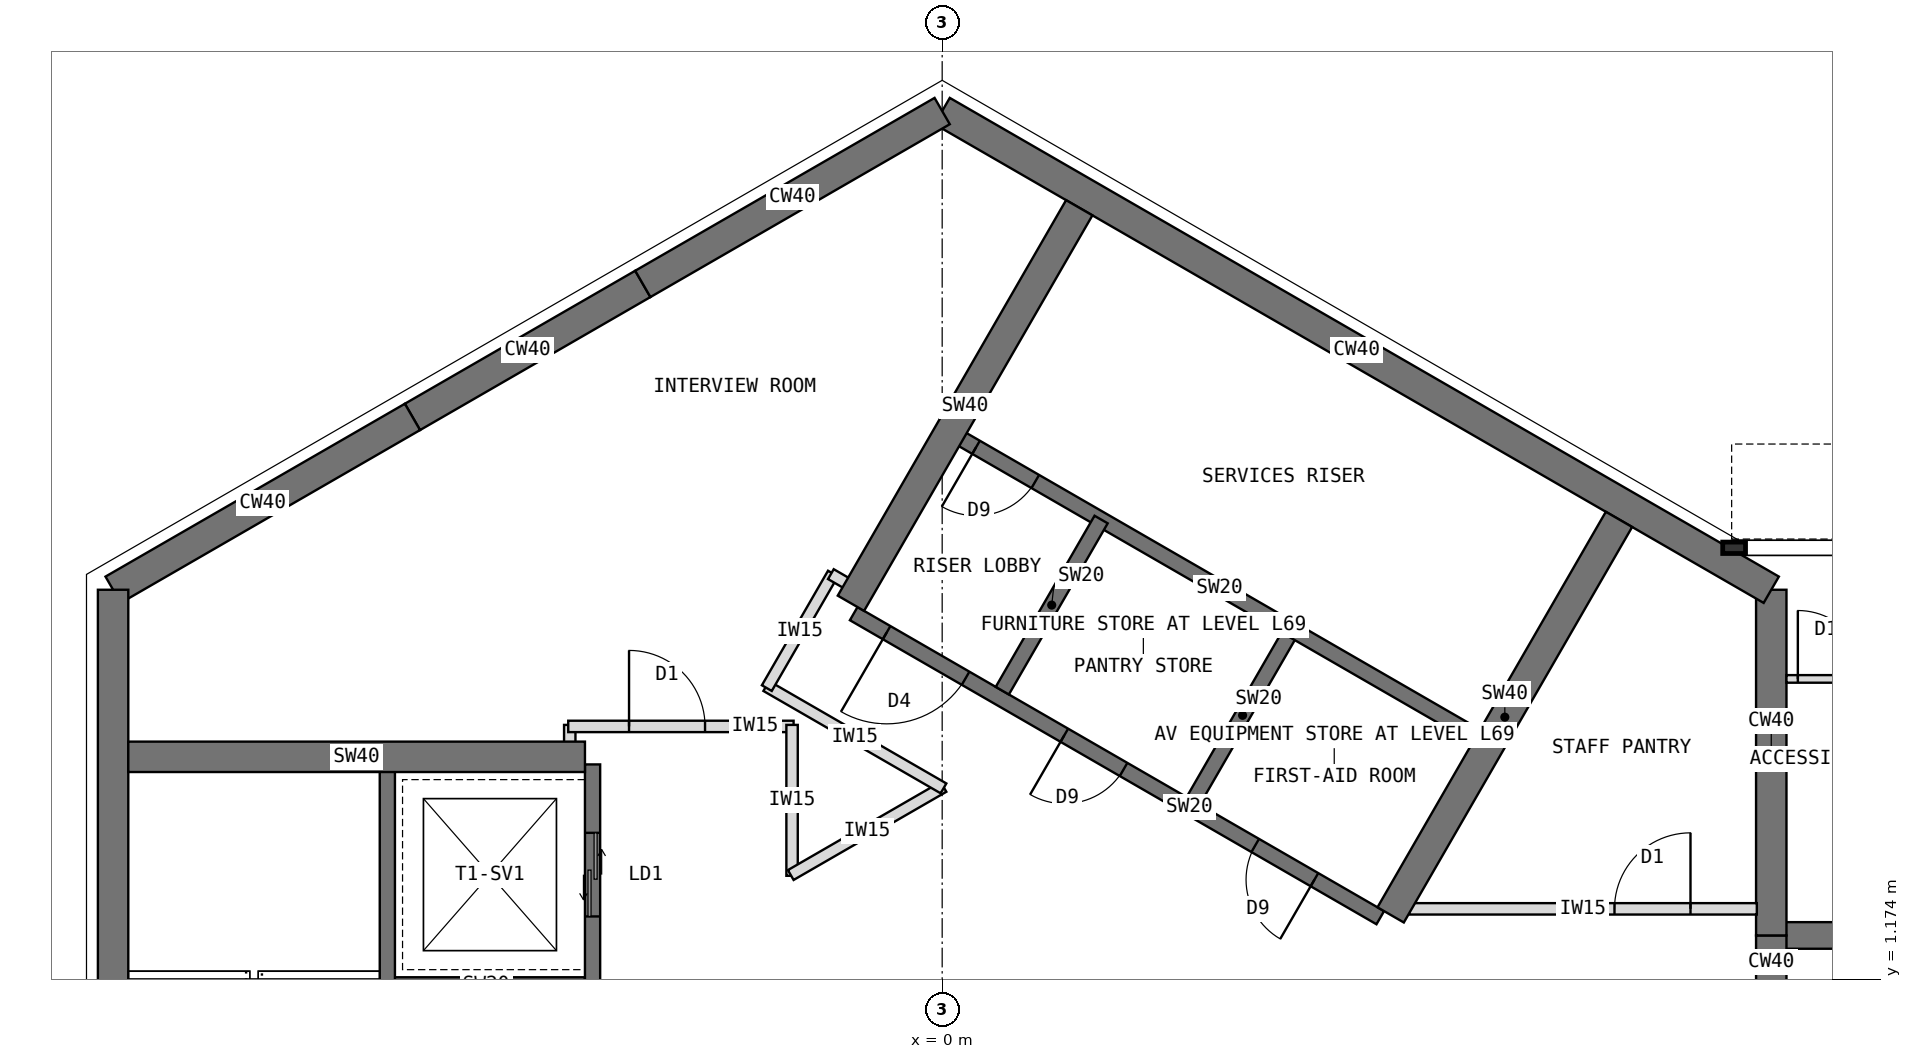
"""IFC4 building model, lengths in metres.
Left out: names, types, materials, properties, quantities, classifications, styles, units other than length and angle.
Written with IfcOpenShell. Run it as: python <this file> out.ifc"""

import sys

from ifc_helpers import new_model, si_unit, direction, frame, frame_2d, origin, place, context, subcontext, project, spatial, rectangle, extrude, element, fill, save


model = new_model("IFC4")
c1 = context("Model", 3, precision=1e-05, world=origin(), true_north=direction((0.0, 1.0)))
c2 = subcontext(c1, "Body", "Model", "MODEL_VIEW")
j1 = project(units=[si_unit("LENGTHUNIT", "METRE"), si_unit("PLANEANGLEUNIT", "RADIAN")], contexts=[c1])
p1 = place(None, origin())
s1 = spatial("IfcSite", under=j1, at=p1, CompositionType="ELEMENT")
p2 = place(p1, origin())
s2 = spatial("IfcBuilding", under=s1, at=p2, CompositionType="ELEMENT")
p3 = place(p2, frame((0.0, 0.0, 279.5)))
s3 = spatial("IfcBuildingStorey", under=s2, at=p3, CompositionType="ELEMENT", Elevation=279.5)
p4 = place(p3, frame((10.908, -1.75, 0.0), z_axis=(0.0, 0.0, 1.0), x_axis=(0.0, 1.0, 0.0)))
e1 = element("IfcWall", 1, at=p4, inside=s3, PredefinedType="SHEAR", context=c2, shape_type="SweptSolid", body=[
    extrude(rectangle(XDim=3.5, YDim=0.4, at=frame_2d((1.75, 0.0))), origin(), (0.0, 0.0, 1.0), 4.0),
])
p5 = place(p4, frame((0.85, 0.0, 0.0)))
e2 = element("IfcOpeningElement", 2, at=p5, cuts=e1, PredefinedType="OPENING", context=c2, shape_type="SweptSolid", body=[
    extrude(rectangle(XDim=1.8, YDim=2.1, at=frame_2d((0.9, 1.05))), frame((0.0, 0.21, 0.0), z_axis=(0.0, -1.0, 0.0), x_axis=(1.0, 0.0, 0.0)), (0.0, 0.0, 1.0), 0.42),
])
p6 = place(p3, frame((10.908, 1.75, 0.0), z_axis=(0.0, 0.0, 1.0), x_axis=(0.0, 1.0, 0.0)))
e3 = element("IfcWall", 3, at=p6, inside=s3, PredefinedType="SHEAR", context=c2, shape_type="SweptSolid", body=[
    extrude(rectangle(XDim=4.548, YDim=0.4, at=frame_2d((2.274, 0.0))), origin(), (0.0, 0.0, 1.0), 4.0),
])
p7 = place(p3, frame((10.908, 6.298, 0.0), z_axis=(0.0, 0.0, 1.0), x_axis=(-0.866021940709, 0.500005998175, 0.0)))
e4 = element("IfcWall", 4, at=p7, inside=s3, PredefinedType="SHEAR", context=c2, shape_type="SweptSolid", body=[
    extrude(rectangle(XDim=12.596, YDim=0.4, at=frame_2d((6.298, 0.0))), origin(), (0.0, 0.0, 1.0), 4.0),
])
p8 = place(p3, frame((0.0, 12.596, 0.0), z_axis=(0.0, 0.0, 1.0), x_axis=(-0.866011268655, -0.500024481964, 0.0)))
e5 = element("IfcWall", 5, at=p8, inside=s3, PredefinedType="SHEAR", context=c2, shape_type="SweptSolid", body=[
    extrude(rectangle(XDim=4.548, YDim=0.4, at=frame_2d((2.274, 0.0))), origin(), (0.0, 0.0, 1.0), 4.0),
])
p9 = place(p3, frame((-3.939, 10.322, 0.0), z_axis=(0.0, 0.0, 1.0), x_axis=(-0.866019471182, -0.500010275428, 0.0)))
e6 = element("IfcWall", 6, at=p9, inside=s3, PredefinedType="SHEAR", context=c2, shape_type="SweptSolid", body=[
    extrude(rectangle(XDim=3.5, YDim=0.4, at=frame_2d((1.75, 0.0))), origin(), (0.0, 0.0, 1.0), 4.0),
])
p10 = place(p3, frame((-6.97, 8.572, 0.0), z_axis=(0.0, 0.0, 1.0), x_axis=(-0.866034513004, -0.499984222037, 0.0)))
e7 = element("IfcWall", 7, at=p10, inside=s3, PredefinedType="SHEAR", context=c2, shape_type="SweptSolid", body=[
    extrude(rectangle(XDim=4.548, YDim=0.4, at=frame_2d((2.274, 0.0))), origin(), (0.0, 0.0, 1.0), 4.0),
])
p11 = place(p3, frame((-10.908, 6.298, 0.0), z_axis=(0.0, 0.0, 1.0), x_axis=(0.0, -1.0, 0.0)))
e8 = element("IfcWall", 8, at=p11, inside=s3, PredefinedType="SHEAR", context=c2, shape_type="SweptSolid", body=[
    extrude(rectangle(XDim=12.596, YDim=0.4, at=frame_2d((6.298, 0.0))), origin(), (0.0, 0.0, 1.0), 4.0),
])
p12 = place(p3, frame((10.908, 1.75, 0.0), z_axis=(0.0, 0.0, 1.0), x_axis=(1.0, 0.0, 0.0)))
e9 = element("IfcWall", 9, at=p12, inside=s3, PredefinedType="SHEAR", context=c2, shape_type="SweptSolid", body=[
    extrude(rectangle(XDim=2.592, YDim=0.35, at=frame_2d((1.296, 0.0))), origin(), (0.0, 0.0, 1.0), 4.0),
])
p13 = place(p3, frame((5.764, 1.984, 0.0), z_axis=(0.0, 0.0, 1.0), x_axis=(-0.866026010844, 0.49999894854, 0.0)))
e10 = element("IfcWall", 10, at=p13, inside=s3, PredefinedType="SHEAR", context=c2, shape_type="SweptSolid", body=[
    extrude(rectangle(XDim=8.0, YDim=0.2, at=frame_2d((4.0, 0.0))), origin(), (0.0, 0.0, 1.0), 4.0),
])
p14 = place(p13, frame((6.3, 0.0, 0.0)))
e11 = element("IfcOpeningElement", 11, at=p14, cuts=e10, PredefinedType="OPENING", context=c2, shape_type="SweptSolid", body=[
    extrude(rectangle(XDim=1.2, YDim=2.1, at=frame_2d((0.6, 1.05))), frame((0.0, 0.11, 0.0), z_axis=(0.0, -1.0, 0.0), x_axis=(1.0, 0.0, 0.0)), (0.0, 0.0, 1.0), 0.22),
])
p15 = place(p13, frame((1.0, 0.0, 0.0)))
e12 = element("IfcOpeningElement", 12, at=p15, cuts=e10, PredefinedType="OPENING", context=c2, shape_type="SweptSolid", body=[
    extrude(rectangle(XDim=0.9, YDim=2.1, at=frame_2d((0.45, 1.05))), frame((0.0, 0.11, 0.0), z_axis=(0.0, -1.0, 0.0), x_axis=(1.0, 0.0, 0.0)), (0.0, 0.0, 1.0), 0.22),
])
p16 = place(p13, frame((3.9, 0.0, 0.0)))
e13 = element("IfcOpeningElement", 13, at=p16, cuts=e10, PredefinedType="OPENING", context=c2, shape_type="SweptSolid", body=[
    extrude(rectangle(XDim=0.9, YDim=2.1, at=frame_2d((0.45, 1.05))), frame((0.0, 0.11, 0.0), z_axis=(0.0, -1.0, 0.0), x_axis=(1.0, 0.0, 0.0)), (0.0, 0.0, 1.0), 0.22),
])
for number, where, z_axis, x_axis in (
    (14, (3.303, 3.52, 0.0), (0.0, 0.0, 1.0), (0.5, 0.866, 0.0)),
    (15, (0.791, 4.97, 0.0), (0.0, 0.0, 1.0), (0.5, 0.866, 0.0)),
):
    element("IfcWall", number, at=place(p3, frame(where, z_axis=z_axis, x_axis=x_axis)), inside=s3, PredefinedType="SHEAR", context=c2, shape_type="SweptSolid", body=[
        extrude(rectangle(XDim=2.6, YDim=0.2, at=frame_2d((1.3, 0.0))), origin(), (0.0, 0.0, 1.0), 4.0),
    ])
p17 = place(p3, frame((7.114, 4.322, 0.0), z_axis=(0.0, 0.0, 1.0), x_axis=(-0.866026010844, 0.49999894854, 0.0)))
e16 = element("IfcWall", 16, at=p17, inside=s3, PredefinedType="SHEAR", context=c2, shape_type="SweptSolid", body=[
    extrude(rectangle(XDim=8.0, YDim=0.2, at=frame_2d((4.0, 0.0))), origin(), (0.0, 0.0, 1.0), 4.0),
])
p18 = place(p17, frame((6.8, 0.0, 0.0)))
e17 = element("IfcOpeningElement", 17, at=p18, cuts=e16, PredefinedType="OPENING", context=c2, shape_type="SweptSolid", body=[
    extrude(rectangle(XDim=0.9, YDim=2.1, at=frame_2d((0.45, 1.05))), frame((0.0, 0.11, 0.0), z_axis=(0.0, -1.0, 0.0), x_axis=(1.0, 0.0, 0.0)), (0.0, 0.0, 1.0), 0.22),
])
for number, where, z_axis, x_axis in (
    (18, (-1.201, 6.12, 0.0), (0.0, 0.0, 1.0), (0.5, 0.866, 0.0)),
    (19, (5.901, 2.02, 0.0), (0.0, 0.0, 1.0), (0.5, 0.866, 0.0)),
):
    element("IfcWall", number, at=place(p3, frame(where, z_axis=z_axis, x_axis=x_axis)), inside=s3, PredefinedType="SHEAR", context=c2, shape_type="SweptSolid", body=[
        extrude(rectangle(XDim=6.008, YDim=0.4, at=frame_2d((3.004, 0.0))), origin(), (0.0, 0.0, 1.0), 4.0),
    ])
p19 = place(p3, frame((-4.6, 4.0, 0.0), z_axis=(0.0, 0.0, 1.0), x_axis=(0.0, -1.0, 0.0)))
e20 = element("IfcWall", 20, at=p19, inside=s3, PredefinedType="SHEAR", context=c2, shape_type="SweptSolid", body=[
    extrude(rectangle(XDim=8.0, YDim=0.2, at=frame_2d((4.0, 0.0))), origin(), (0.0, 0.0, 1.0), 4.0),
])
p20 = place(p19, frame((6.3, 0.0, 0.0)))
e21 = element("IfcOpeningElement", 21, at=p20, cuts=e20, PredefinedType="OPENING", context=c2, shape_type="SweptSolid", body=[
    extrude(rectangle(XDim=1.2, YDim=2.1, at=frame_2d((0.6, 1.05))), frame((0.0, 0.11, 0.0), z_axis=(0.0, -1.0, 0.0), x_axis=(1.0, 0.0, 0.0)), (0.0, 0.0, 1.0), 0.22),
])
p21 = place(p19, frame((0.9, 0.0, 0.0)))
e22 = element("IfcOpeningElement", 22, at=p21, cuts=e20, PredefinedType="OPENING", context=c2, shape_type="SweptSolid", body=[
    extrude(rectangle(XDim=1.1, YDim=2.2, at=frame_2d((0.55, 1.1))), frame((0.0, 0.11, 0.0), z_axis=(0.0, -1.0, 0.0), x_axis=(1.0, 0.0, 0.0)), (0.0, 0.0, 1.0), 0.22),
])
p22 = place(p3, frame((-4.7, 1.1, 0.0), z_axis=(0.0, 0.0, 1.0), x_axis=(-1.0, 0.0, 0.0)))
e23 = element("IfcWall", 23, at=p22, inside=s3, PredefinedType="SHEAR", context=c2, shape_type="SweptSolid", body=[
    extrude(rectangle(XDim=2.6, YDim=0.2, at=frame_2d((1.3, 0.0))), origin(), (0.0, 0.0, 1.0), 4.0),
])
p23 = place(p3, frame((-7.3, 4.0, 0.0), z_axis=(0.0, 0.0, 1.0), x_axis=(0.0, -1.0, 0.0)))
e24 = element("IfcWall", 24, at=p23, inside=s3, PredefinedType="SHEAR", context=c2, shape_type="SweptSolid", body=[
    extrude(rectangle(XDim=8.0, YDim=0.2, at=frame_2d((4.0, 0.0))), origin(), (0.0, 0.0, 1.0), 4.0),
])
p24 = place(p23, frame((6.7, 0.0, 0.0)))
e25 = element("IfcOpeningElement", 25, at=p24, cuts=e24, PredefinedType="OPENING", context=c2, shape_type="SweptSolid", body=[
    extrude(rectangle(XDim=1.1, YDim=2.1, at=frame_2d((0.55, 1.05))), frame((0.0, 0.11, 0.0), z_axis=(0.0, -1.0, 0.0), x_axis=(1.0, 0.0, 0.0)), (0.0, 0.0, 1.0), 0.22),
])
p25 = place(p3, frame((-4.7, 4.1, 0.0), z_axis=(0.0, 0.0, 1.0), x_axis=(-1.0, 0.0, 0.0)))
e26 = element("IfcWall", 26, at=p25, inside=s3, PredefinedType="SHEAR", context=c2, shape_type="SweptSolid", body=[
    extrude(rectangle(XDim=6.008, YDim=0.4, at=frame_2d((3.004, 0.0))), origin(), (0.0, 0.0, 1.0), 4.0),
])
p26 = place(p3, frame((11.108, 5.125, 0.0), z_axis=(0.0, 0.0, 1.0), x_axis=(1.0, 0.0, 0.0)))
e27 = element("IfcWall", 27, at=p26, inside=s3, PredefinedType="PARTITIONING", context=c2, shape_type="SweptSolid", body=[
    extrude(rectangle(XDim=2.4, YDim=0.1, at=frame_2d((1.2, 0.0))), origin(), (0.0, 0.0, 1.0), 3.8),
])
p27 = place(p26, frame((0.15, 0.0, 0.0)))
e28 = element("IfcOpeningElement", 28, at=p27, cuts=e27, PredefinedType="OPENING", context=c2, shape_type="SweptSolid", body=[
    extrude(rectangle(XDim=0.9, YDim=2.1, at=frame_2d((0.45, 1.05))), frame((0.0, 0.06, 0.0), z_axis=(0.0, -1.0, 0.0), x_axis=(1.0, 0.0, 0.0)), (0.0, 0.0, 1.0), 0.12),
])
p28 = place(p3, frame((-4.9, 4.09, 0.0), z_axis=(0.0, 0.0, 1.0), x_axis=(0.0, 1.0, 0.0)))
e29 = element("IfcWall", 29, at=p28, inside=s3, PredefinedType="PARTITIONING", context=c2, shape_type="SweptSolid", body=[
    extrude(rectangle(XDim=0.43, YDim=0.15, at=frame_2d((0.215, 0.0))), origin(), (0.0, 0.0, 1.0), 3.8),
])
p29 = place(p3, frame((-4.92, 4.5, 0.0), z_axis=(0.0, 0.0, 1.0), x_axis=(1.0, 0.0, 0.0)))
e30 = element("IfcWall", 30, at=p29, inside=s3, PredefinedType="PARTITIONING", context=c2, shape_type="SweptSolid", body=[
    extrude(rectangle(XDim=2.965, YDim=0.15, at=frame_2d((1.482, 0.0))), origin(), (0.0, 0.0, 1.0), 3.8),
])
p30 = place(p29, frame((0.8, 0.0, 0.0)))
e31 = element("IfcOpeningElement", 31, at=p30, cuts=e30, PredefinedType="OPENING", context=c2, shape_type="SweptSolid", body=[
    extrude(rectangle(XDim=1.0, YDim=2.1, at=frame_2d((0.5, 1.05))), frame((0.0, 0.085, 0.0), z_axis=(0.0, -1.0, 0.0), x_axis=(1.0, 0.0, 0.0)), (0.0, 0.0, 1.0), 0.17),
])
p31 = place(p3, frame((-1.975, 4.52, 0.0), z_axis=(0.0, 0.0, 1.0), x_axis=(0.0, -1.0, 0.0)))
e32 = element("IfcWall", 32, at=p31, inside=s3, PredefinedType="PARTITIONING", context=c2, shape_type="SweptSolid", body=[
    extrude(rectangle(XDim=1.985, YDim=0.15, at=frame_2d((0.993, 0.0))), origin(), (0.0, 0.0, 1.0), 3.8),
])
p32 = place(p3, frame((-1.992, 2.545, 0.0), z_axis=(0.0, 0.0, 1.0), x_axis=(0.866059450854, 0.499941024108, 0.0)))
e33 = element("IfcWall", 33, at=p32, inside=s3, PredefinedType="PARTITIONING", context=c2, shape_type="SweptSolid", body=[
    extrude(rectangle(XDim=2.321, YDim=0.15, at=frame_2d((1.16, 0.0))), origin(), (0.0, 0.0, 1.0), 3.8),
])
p33 = place(p3, frame((0.017, 3.685, 0.0), z_axis=(0.0, 0.0, 1.0), x_axis=(-0.866036099759, 0.499981473571, 0.0)))
e34 = element("IfcWall", 34, at=p33, inside=s3, PredefinedType="PARTITIONING", context=c2, shape_type="SweptSolid", body=[
    extrude(rectangle(XDim=2.692, YDim=0.15, at=frame_2d((1.346, 0.0))), origin(), (0.0, 0.0, 1.0), 3.8),
])
p34 = place(p3, frame((-2.307, 5.004, 0.0), z_axis=(0.0, 0.0, 1.0), x_axis=(0.500062521093, 0.865989304205, 0.0)))
e35 = element("IfcWall", 35, at=p34, inside=s3, PredefinedType="PARTITIONING", context=c2, shape_type="SweptSolid", body=[
    extrude(rectangle(XDim=1.74, YDim=0.15, at=frame_2d((0.87, 0.0))), origin(), (0.0, 0.0, 1.0), 3.8),
])
p35 = place(p3, frame((-1.464, 6.503, 0.0), z_axis=(0.0, 0.0, 1.0), x_axis=(0.866138304741, -0.499804398801, 0.0)))
e36 = element("IfcWall", 36, at=p35, inside=s3, PredefinedType="PARTITIONING", context=c2, shape_type="SweptSolid", body=[
    extrude(rectangle(XDim=0.43, YDim=0.15, at=frame_2d((0.215, 0.0))), origin(), (0.0, 0.0, 1.0), 3.8),
])
p36 = place(p3, frame((6.143, 2.1, 0.0), z_axis=(0.0, 0.0, 1.0), x_axis=(1.0, 0.0, 0.0)))
e37 = element("IfcWall", 37, at=p36, inside=s3, PredefinedType="PARTITIONING", context=c2, shape_type="SweptSolid", body=[
    extrude(rectangle(XDim=4.576, YDim=0.15, at=frame_2d((2.288, 0.0))), origin(), (0.0, 0.0, 1.0), 3.8),
])
p37 = place(p36, frame((2.703, 0.0, 0.0)))
e38 = element("IfcOpeningElement", 38, at=p37, cuts=e37, PredefinedType="OPENING", context=c2, shape_type="SweptSolid", body=[
    extrude(rectangle(XDim=1.0, YDim=2.1, at=frame_2d((0.5, 1.05))), frame((0.0, 0.085, 0.0), z_axis=(0.0, -1.0, 0.0), x_axis=(1.0, 0.0, 0.0)), (0.0, 0.0, 1.0), 0.17),
])
p38 = place(p14, origin())
e39 = element("IfcDoor", 39, at=p38, inside=s3, OperationType="SINGLE_SWING_RIGHT", PredefinedType="DOOR", context=c2, shape_type="SweptSolid", body=[
    extrude(rectangle(XDim=1.2, YDim=2.1, at=frame_2d((0.6, 1.05))), frame((0.0, 0.025, 0.0), z_axis=(0.0, -1.0, 0.0), x_axis=(1.0, 0.0, 0.0)), (0.0, 0.0, 1.0), 0.05),
])
fill(e11, e39)
p39 = place(p18, origin())
e40 = element("IfcDoor", 40, at=p39, inside=s3, OperationType="SINGLE_SWING_RIGHT", PredefinedType="DOOR", context=c2, shape_type="SweptSolid", body=[
    extrude(rectangle(XDim=0.9, YDim=2.1, at=frame_2d((0.45, 1.05))), frame((0.0, 0.025, 0.0), z_axis=(0.0, -1.0, 0.0), x_axis=(1.0, 0.0, 0.0)), (0.0, 0.0, 1.0), 0.05),
])
fill(e17, e40)
p40 = place(p21, origin())
e41 = element("IfcDoor", 41, at=p40, inside=s3, OperationType="DOUBLE_DOOR_SLIDING", PredefinedType="DOOR", context=c2, shape_type="SweptSolid", body=[
    extrude(rectangle(XDim=1.1, YDim=2.2, at=frame_2d((0.55, 1.1))), frame((0.0, 0.025, 0.0), z_axis=(0.0, -1.0, 0.0), x_axis=(1.0, 0.0, 0.0)), (0.0, 0.0, 1.0), 0.05),
])
fill(e22, e41)
p41 = place(p27, origin())
e42 = element("IfcDoor", 42, at=p41, inside=s3, OperationType="SINGLE_SWING_LEFT", PredefinedType="DOOR", context=c2, shape_type="SweptSolid", body=[
    extrude(rectangle(XDim=0.9, YDim=2.1, at=frame_2d((0.45, 1.05))), frame((0.0, 0.025, 0.0), z_axis=(0.0, -1.0, 0.0), x_axis=(1.0, 0.0, 0.0)), (0.0, 0.0, 1.0), 0.05),
])
fill(e28, e42)
p42 = place(p37, origin())
e43 = element("IfcDoor", 43, at=p42, inside=s3, OperationType="SINGLE_SWING_RIGHT", PredefinedType="DOOR", context=c2, shape_type="SweptSolid", body=[
    extrude(rectangle(XDim=1.0, YDim=2.1, at=frame_2d((0.5, 1.05))), frame((0.0, 0.025, 0.0), z_axis=(0.0, -1.0, 0.0), x_axis=(1.0, 0.0, 0.0)), (0.0, 0.0, 1.0), 0.05),
])
fill(e38, e43)
p43 = place(p30, origin())
e44 = element("IfcDoor", 44, at=p43, inside=s3, OperationType="SINGLE_SWING_LEFT", PredefinedType="DOOR", context=c2, shape_type="SweptSolid", body=[
    extrude(rectangle(XDim=1.0, YDim=2.1, at=frame_2d((0.5, 1.05))), frame((0.0, 0.025, 0.0), z_axis=(0.0, -1.0, 0.0), x_axis=(1.0, 0.0, 0.0)), (0.0, 0.0, 1.0), 0.05),
])
fill(e31, e44)
p44 = place(p15, origin())
e45 = element("IfcDoor", 45, at=p44, inside=s3, OperationType="SINGLE_SWING_LEFT", PredefinedType="DOOR", context=c2, shape_type="SweptSolid", body=[
    extrude(rectangle(XDim=0.9, YDim=2.1, at=frame_2d((0.45, 1.05))), frame((0.0, 0.025, 0.0), z_axis=(0.0, -1.0, 0.0), x_axis=(1.0, 0.0, 0.0)), (0.0, 0.0, 1.0), 0.05),
])
fill(e12, e45)
p45 = place(p16, origin())
e46 = element("IfcDoor", 46, at=p45, inside=s3, OperationType="SINGLE_SWING_RIGHT", PredefinedType="DOOR", context=c2, shape_type="SweptSolid", body=[
    extrude(rectangle(XDim=0.9, YDim=2.1, at=frame_2d((0.45, 1.05))), frame((0.0, 0.025, 0.0), z_axis=(0.0, -1.0, 0.0), x_axis=(1.0, 0.0, 0.0)), (0.0, 0.0, 1.0), 0.05),
])
fill(e13, e46)
save(model, sys.argv[1])
